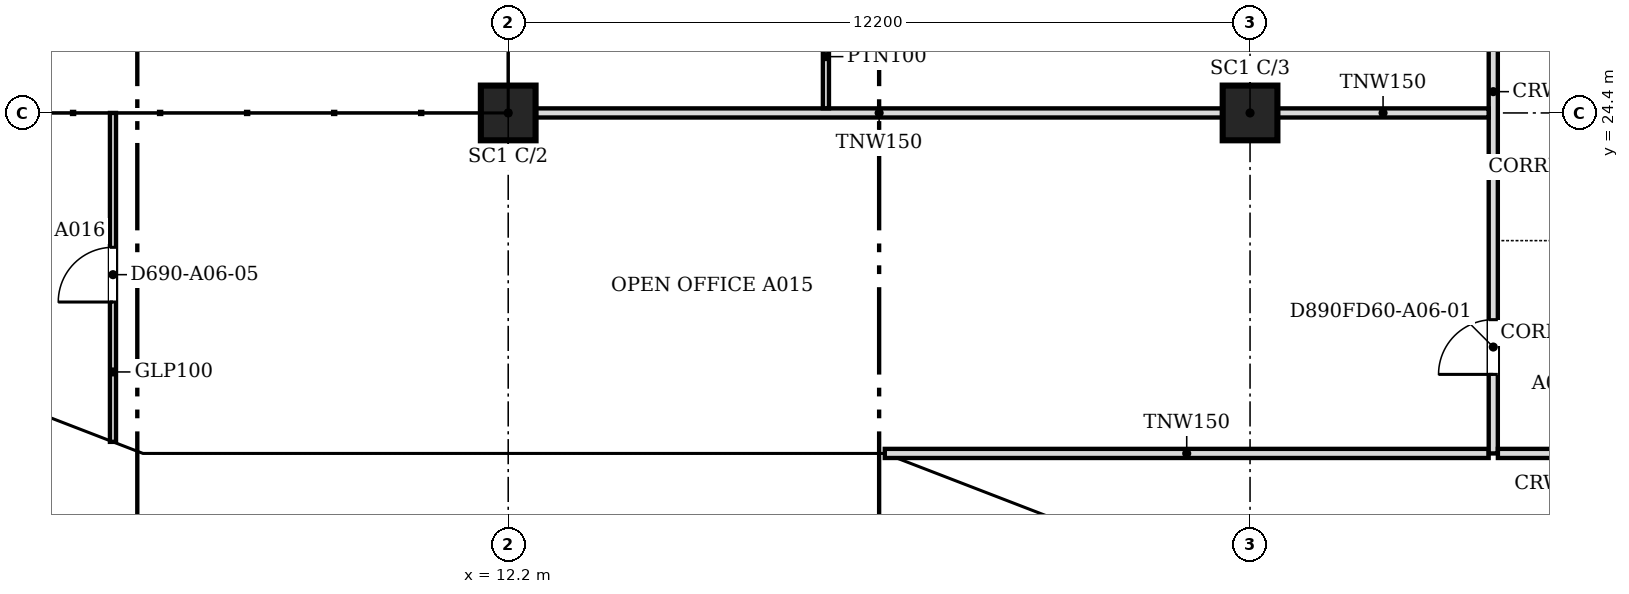
"""IFC4 building model, lengths in metres.
Left out: names, types, materials, properties, quantities, classifications, styles, units other than length and angle.
Written with IfcOpenShell. Run it as: python <this file> out.ifc"""

import sys

from ifc_helpers import new_model, si_unit, direction, frame, frame_2d, origin, origin_2d, place, context, subcontext, project, spatial, polyline, rectangle, outline, extrude, faceted_brep, source, transform, mapped, element, fill, save


model = new_model("IFC4")
c1 = context("Model", 3, precision=1e-05, world=origin(), true_north=direction((0.0, 1.0)))
c2 = subcontext(c1, "Body", "Model", "MODEL_VIEW")
j1 = project(units=[si_unit("LENGTHUNIT", "METRE"), si_unit("PLANEANGLEUNIT", "RADIAN")], contexts=[c1])
p1 = place(None, origin())
s1 = spatial("IfcSite", under=j1, at=p1, CompositionType="ELEMENT")
p2 = place(p1, origin())
s2 = spatial("IfcBuilding", under=s1, at=p2, CompositionType="ELEMENT")
p3 = place(p2, frame((0.0, 0.0, 72.4)))
s3 = spatial("IfcBuildingStorey", under=s2, at=p3, CompositionType="ELEMENT", Elevation=72.4)
for number, where, z_axis, x_axis in (
    (1, (12.2, 24.4, 0.0), (0.0, 0.0, 1.0), (1.0, 0.0, 0.0)),
    (2, (24.4, 24.4, 0.0), (0.0, 0.0, 1.0), (1.0, 0.0, 0.0)),
):
    element("IfcColumn", number, at=place(p3, frame(where, z_axis=z_axis, x_axis=x_axis)), inside=s3, PredefinedType="COLUMN", context=c2, shape_type="SweptSolid", body=[
        extrude(rectangle(XDim=0.9, YDim=0.9, at=origin_2d()), origin(), (0.0, 0.0, 1.0), 3.6),
    ])
m1 = source(origin(), c2, "Body", "Brep", [
    faceted_brep([(0.053, -0.25, 0.0), (3.003, -0.25, 3.8), (0.053, -0.25, 7.6), (0.0, -0.25, 7.531), (0.0, -0.25, 0.068), (0.106, 0.25, 7.532), (2.957, 0.25, 3.86), (2.957, 0.25, 3.74), (0.106, 0.25, 0.068), (3.003, 0.0, 3.8), (0.053, 0.0, 0.0), (0.053, 0.0, 7.6)], [[[0, 1, 2, 3, 4]], [[5, 6, 7, 8]], [[8, 7, 9, 1, 0, 10]], [[6, 5, 11, 2, 1, 9]], [[3, 2, 11]], [[10, 0, 4]], [[8, 10, 4, 3, 11, 5]], [[9, 7, 6]]]),
])
p4 = place(p3, frame((3.344, 19.631, -3.8), z_axis=(0.0, 0.0, 1.0), x_axis=(0.933007896601, -0.359855894603, 0.0)))
e3 = element("IfcWall", 3, at=p4, inside=s3, PredefinedType="SOLIDWALL", context=c2, shape_type="MappedRepresentation", body=[
    mapped(m1, transform((0.0, 0.0, 0.0), scale=1.0)),
])
m2 = source(origin(), c2, "Body", "SweptSolid", [
    extrude(outline(polyline([(0.253, 0.665), (2.687, 3.8), (0.253, 6.935), (0.253, 0.665)])), frame((0.0, 0.26, 0.0), z_axis=(0.0, -1.0, 0.0), x_axis=(1.0, 0.0, 0.0)), (0.0, 0.0, 1.0), 0.52),
])
p5 = place(p4, origin())
e4 = element("IfcOpeningElement", 4, at=p5, cuts=e3, PredefinedType="OPENING", context=c2, shape_type="MappedRepresentation", body=[
    mapped(m2, transform((0.0, 0.0, 0.0), scale=1.0)),
])
m3 = source(origin(), c2, "Body", "Brep", [
    faceted_brep([(3.003, -0.25, 0.0), (6.053, -0.25, 3.8), (3.003, -0.25, 7.6), (0.0, -0.25, 3.8), (0.047, 0.25, 3.859), (3.003, 0.25, 7.6), (6.053, 0.25, 3.8), (3.003, 0.25, 0.0), (0.047, 0.25, 3.741), (0.0, 0.0, 3.8)], [[[0, 1, 2, 3]], [[4, 5, 6, 7, 8]], [[7, 6, 1, 0]], [[6, 5, 2, 1]], [[5, 4, 9, 3, 2]], [[8, 7, 0, 3, 9]], [[8, 9, 4]]]),
])
p6 = place(p3, frame((6.146, 18.55, -3.8), z_axis=(0.0, 0.0, 1.0), x_axis=(1.0, 0.0, 0.0)))
e5 = element("IfcWall", 5, at=p6, inside=s3, PredefinedType="SOLIDWALL", context=c2, shape_type="MappedRepresentation", body=[
    mapped(m3, transform((0.0, 0.0, 0.0), scale=1.0)),
])
m4 = source(origin(), c2, "Body", "SweptSolid", [
    extrude(outline(polyline([(3.005, 0.401), (5.733, 3.8), (3.005, 7.199), (0.319, 3.8), (3.005, 0.401)])), frame((0.0, 0.26, 0.0), z_axis=(0.0, -1.0, 0.0), x_axis=(1.0, 0.0, 0.0)), (0.0, 0.0, 1.0), 0.52),
])
p7 = place(p6, origin())
e6 = element("IfcOpeningElement", 6, at=p7, cuts=e5, PredefinedType="OPENING", context=c2, shape_type="MappedRepresentation", body=[
    mapped(m4, transform((0.0, 0.0, 0.0), scale=1.0)),
])
m5 = source(origin(), c2, "Body", "Brep", [
    faceted_brep([(3.05, -0.25, 0.0), (6.1, -0.25, 3.743), (6.1, -0.25, 3.857), (3.05, -0.25, 7.6), (0.0, -0.25, 3.8), (0.0, 0.25, 3.8), (3.05, 0.25, 7.6), (6.146, 0.25, 3.8), (3.05, 0.25, 0.0), (6.146, -0.0, 3.8)], [[[0, 1, 2, 3, 4]], [[5, 6, 7, 8]], [[8, 7, 9, 1, 0]], [[7, 6, 3, 2, 9]], [[6, 5, 4, 3]], [[5, 8, 0, 4]], [[1, 9, 2]]]),
])
p8 = place(p3, frame((12.2, 18.55, -3.8), z_axis=(0.0, 0.0, 1.0), x_axis=(1.0, 0.0, 0.0)))
e7 = element("IfcWall", 7, at=p8, inside=s3, PredefinedType="SOLIDWALL", context=c2, shape_type="MappedRepresentation", body=[
    mapped(m5, transform((0.0, 0.0, 0.0), scale=1.0)),
])
m6 = source(origin(), c2, "Body", "SweptSolid", [
    extrude(outline(polyline([(3.052, 0.397), (5.824, 3.8), (3.052, 7.202), (0.321, 3.8), (3.052, 0.397)])), frame((0.0, 0.26, 0.0), z_axis=(0.0, -1.0, 0.0), x_axis=(1.0, 0.0, 0.0)), (0.0, 0.0, 1.0), 0.52),
])
p9 = place(p8, origin())
e8 = element("IfcOpeningElement", 8, at=p9, cuts=e7, PredefinedType="OPENING", context=c2, shape_type="MappedRepresentation", body=[
    mapped(m6, transform((0.0, 0.0, 0.0), scale=1.0)),
])
m7 = source(origin(), c2, "Body", "Brep", [
    faceted_brep([(3.096, -0.25, 7.536), (0.047, -0.25, 3.856), (0.047, -0.25, 3.744), (3.096, -0.25, 0.064), (0.0, 0.25, 3.8), (3.149, 0.25, 7.6), (3.202, 0.25, 7.536), (3.202, 0.25, 0.064), (3.149, 0.25, 0.0), (3.149, -0.0, 0.0), (3.149, -0.0, 7.6), (0.0, 0.0, 3.8)], [[[0, 1, 2, 3]], [[4, 5, 6, 7, 8]], [[8, 7, 9]], [[6, 5, 10]], [[5, 4, 11, 1, 0, 10]], [[4, 8, 9, 3, 2, 11]], [[11, 2, 1]], [[3, 9, 7, 6, 10, 0]]]),
])
p10 = place(p3, frame((18.346, 18.55, -3.8), z_axis=(0.0, 0.0, 1.0), x_axis=(0.932985567668, -0.359913782069, 0.0)))
e9 = element("IfcWall", 9, at=p10, inside=s3, PredefinedType="SOLIDWALL", context=c2, shape_type="MappedRepresentation", body=[
    mapped(m7, transform((0.0, 0.0, 0.0), scale=1.0)),
])
m8 = source(origin(), c2, "Body", "SweptSolid", [
    extrude(outline(polyline([(2.949, 6.967), (0.325, 3.8), (2.949, 0.633), (2.949, 6.967)])), frame((0.0, 0.26, 0.0), z_axis=(0.0, -1.0, 0.0), x_axis=(1.0, 0.0, 0.0)), (0.0, 0.0, 1.0), 0.52),
])
p11 = place(p10, origin())
e10 = element("IfcOpeningElement", 10, at=p11, cuts=e9, PredefinedType="OPENING", context=c2, shape_type="MappedRepresentation", body=[
    mapped(m8, transform((0.0, 0.0, 0.0), scale=1.0)),
])
p12 = place(p2, frame((0.0, 0.0, 76.2)))
s4 = spatial("IfcBuildingStorey", under=s2, at=p12, CompositionType="ELEMENT", Elevation=76.2)
m9 = source(origin(), c2, "Body", "Brep", [
    faceted_brep([(2.95, -0.25, 0.0), (2.997, -0.25, 0.059), (2.997, -0.25, 7.541), (2.95, -0.25, 7.6), (0.0, -0.25, 3.8), (0.053, 0.25, 3.868), (2.904, 0.25, 7.54), (2.904, 0.25, 0.06), (0.053, 0.25, 3.732), (2.95, 0.0, 0.0), (2.95, 0.0, 7.6), (0.0, 0.0, 3.8)], [[[0, 1, 2, 3, 4]], [[5, 6, 7, 8]], [[1, 0, 9]], [[10, 3, 2]], [[6, 5, 11, 4, 3, 10]], [[8, 7, 9, 0, 4, 11]], [[8, 11, 5]], [[1, 9, 7, 6, 10, 2]]]),
])
p13 = place(p12, frame((3.394, 19.612, -3.8), z_axis=(0.0, 0.0, 1.0), x_axis=(0.932990326376, -0.359901446078, 0.0)))
e11 = element("IfcWall", 11, at=p13, inside=s4, PredefinedType="SOLIDWALL", context=c2, shape_type="MappedRepresentation", body=[
    mapped(m9, transform((0.0, 0.0, 0.0), scale=1.0)),
])
m10 = source(origin(), c2, "Body", "SweptSolid", [
    extrude(outline(polyline([(2.75, 6.935), (0.316, 3.8), (2.75, 0.665), (2.75, 6.935)])), frame((0.0, 0.26, 0.0), z_axis=(0.0, -1.0, 0.0), x_axis=(1.0, 0.0, 0.0)), (0.0, 0.0, 1.0), 0.52),
])
p14 = place(p13, origin())
e12 = element("IfcOpeningElement", 12, at=p14, cuts=e11, PredefinedType="OPENING", context=c2, shape_type="MappedRepresentation", body=[
    mapped(m10, transform((0.0, 0.0, 0.0), scale=1.0)),
])
m11 = source(origin(), c2, "Body", "Brep", [
    faceted_brep([(0.047, -0.25, 0.0), (3.05, -0.25, 3.8), (0.047, -0.25, 7.6), (0.0, -0.25, 7.54), (0.0, -0.25, 0.06), (0.093, 0.25, 7.541), (3.05, 0.25, 3.8), (0.093, 0.25, 0.059), (0.047, 0.0, 0.0), (0.047, 0.0, 7.6)], [[[0, 1, 2, 3, 4]], [[5, 6, 7]], [[7, 6, 1, 0, 8]], [[6, 5, 9, 2, 1]], [[3, 2, 9]], [[8, 0, 4]], [[7, 8, 4, 3, 9, 5]]]),
])
p15 = place(p12, frame((6.1, 18.55, -3.8), z_axis=(0.0, 0.0, 1.0), x_axis=(1.0, 0.0, 0.0)))
e13 = element("IfcWall", 13, at=p15, inside=s4, PredefinedType="SOLIDWALL", context=c2, shape_type="MappedRepresentation", body=[
    mapped(m11, transform((0.0, 0.0, 0.0), scale=1.0)),
])
m12 = source(origin(), c2, "Body", "SweptSolid", [
    extrude(outline(polyline([(0.247, 0.656), (2.731, 3.8), (0.247, 6.944), (0.247, 0.656)])), frame((0.0, 0.26, 0.0), z_axis=(0.0, -1.0, 0.0), x_axis=(1.0, 0.0, 0.0)), (0.0, 0.0, 1.0), 0.52),
])
p16 = place(p15, origin())
e14 = element("IfcOpeningElement", 14, at=p16, cuts=e13, PredefinedType="OPENING", context=c2, shape_type="MappedRepresentation", body=[
    mapped(m12, transform((0.0, 0.0, 0.0), scale=1.0)),
])
m13 = source(origin(), c2, "Body", "SweptSolid", [
    extrude(outline(polyline([(3.05, 0.0), (6.1, 3.8), (3.05, 7.6), (0.0, 3.8), (3.05, 0.0)])), frame((0.0, 0.25, 0.0), z_axis=(0.0, -1.0, 0.0), x_axis=(1.0, 0.0, 0.0)), (0.0, 0.0, 1.0), 0.5),
])
p17 = place(p12, frame((9.15, 18.55, -3.8), z_axis=(0.0, 0.0, 1.0), x_axis=(1.0, 0.0, 0.0)))
e15 = element("IfcWall", 15, at=p17, inside=s4, PredefinedType="SOLIDWALL", context=c2, shape_type="MappedRepresentation", body=[
    mapped(m13, transform((0.0, 0.0, 0.0), scale=1.0)),
])
m14 = source(origin(), c2, "Body", "SweptSolid", [
    extrude(outline(polyline([(3.05, 0.399), (5.78, 3.8), (3.05, 7.201), (0.321, 3.8), (3.05, 0.399)])), frame((0.0, 0.26, 0.0), z_axis=(0.0, -1.0, 0.0), x_axis=(1.0, 0.0, 0.0)), (0.0, 0.0, 1.0), 0.52),
])
p18 = place(p17, origin())
e16 = element("IfcOpeningElement", 16, at=p18, cuts=e15, PredefinedType="OPENING", context=c2, shape_type="MappedRepresentation", body=[
    mapped(m14, transform((0.0, 0.0, 0.0), scale=1.0)),
])
m15 = source(origin(), c2, "Body", "Brep", [
    faceted_brep([(3.05, -0.25, 7.543), (0.0, -0.25, 3.8), (3.05, -0.25, 0.057), (0.0, 0.25, 3.8), (3.096, 0.25, 7.6), (3.143, 0.25, 7.544), (3.143, 0.25, 0.056), (3.096, 0.25, 0.0), (3.096, -0.0, 0.0), (3.096, -0.0, 7.6)], [[[0, 1, 2]], [[3, 4, 5, 6, 7]], [[7, 6, 8]], [[5, 4, 9]], [[4, 3, 1, 0, 9]], [[3, 7, 8, 2, 1]], [[2, 8, 6, 5, 9, 0]]]),
])
p19 = place(p12, frame((15.25, 18.55, -3.8), z_axis=(0.0, 0.0, 1.0), x_axis=(1.0, 0.0, 0.0)))
e17 = element("IfcWall", 17, at=p19, inside=s4, PredefinedType="SOLIDWALL", context=c2, shape_type="MappedRepresentation", body=[
    mapped(m15, transform((0.0, 0.0, 0.0), scale=1.0)),
])
m16 = source(origin(), c2, "Body", "SweptSolid", [
    extrude(outline(polyline([(2.896, 6.959), (0.323, 3.8), (2.896, 0.641), (2.896, 6.959)])), frame((0.0, 0.26, 0.0), z_axis=(0.0, -1.0, 0.0), x_axis=(1.0, 0.0, 0.0)), (0.0, 0.0, 1.0), 0.52),
])
p20 = place(p19, origin())
e18 = element("IfcOpeningElement", 18, at=p20, cuts=e17, PredefinedType="OPENING", context=c2, shape_type="MappedRepresentation", body=[
    mapped(m16, transform((0.0, 0.0, 0.0), scale=1.0)),
])
m17 = source(origin(), c2, "Body", "Brep", [
    faceted_brep([(0.093, -0.25, 0.056), (3.143, -0.25, 3.736), (3.143, -0.25, 3.864), (0.093, -0.25, 7.544), (0.0, 0.25, 7.543), (0.047, 0.25, 7.6), (3.196, 0.25, 3.8), (0.047, 0.25, 0.0), (0.0, 0.25, 0.057), (3.196, -0.0, 3.8), (0.047, 0.0, 0.0), (0.047, 0.0, 7.6)], [[[0, 1, 2, 3]], [[4, 5, 6, 7, 8]], [[7, 6, 9, 1, 0, 10]], [[6, 5, 11, 3, 2, 9]], [[5, 4, 11]], [[8, 7, 10]], [[8, 10, 0, 3, 11, 4]], [[1, 9, 2]]]),
])
p21 = place(p12, frame((18.303, 18.567, -3.8), z_axis=(0.0, 0.0, 1.0), x_axis=(0.932978940178, -0.359930961693, 0.0)))
e19 = element("IfcWall", 19, at=p21, inside=s4, PredefinedType="SOLIDWALL", context=c2, shape_type="MappedRepresentation", body=[
    mapped(m17, transform((0.0, 0.0, 0.0), scale=1.0)),
])
m18 = source(origin(), c2, "Body", "SweptSolid", [
    extrude(outline(polyline([(0.247, 0.633), (2.871, 3.8), (0.247, 6.967), (0.247, 0.633)])), frame((0.0, 0.26, 0.0), z_axis=(0.0, -1.0, 0.0), x_axis=(1.0, 0.0, 0.0)), (0.0, 0.0, 1.0), 0.52),
])
p22 = place(p21, origin())
e20 = element("IfcOpeningElement", 20, at=p22, cuts=e19, PredefinedType="OPENING", context=c2, shape_type="MappedRepresentation", body=[
    mapped(m18, transform((0.0, 0.0, 0.0), scale=1.0)),
])
p23 = place(p3, frame((18.393, 18.8, 0.0), z_axis=(0.0, 0.0, 1.0), x_axis=(1.0, 0.0, 0.0)))
e21 = element("IfcWall", 21, at=p23, inside=s3, PredefinedType="PARTITIONING", context=c2, shape_type="SweptSolid", body=[
    extrude(rectangle(XDim=9.931, YDim=0.15, at=frame_2d((4.965, 0.0))), origin(), (0.0, 0.0, 1.0), 3.067),
])
p24 = place(p3, frame((28.4, 18.8, 0.0), z_axis=(0.0, 0.0, 1.0), x_axis=(0.0, 1.0, 0.0)))
e22 = element("IfcWall", 22, at=p24, inside=s3, PredefinedType="PARTITIONING", context=c2, shape_type="SweptSolid", body=[
    extrude(rectangle(XDim=26.824, YDim=0.15, at=frame_2d((13.412, 0.0))), origin(), (0.0, 0.0, 1.0), 3.067),
])
m19 = source(origin(), c2, "Body", "SweptSolid", [
    extrude(rectangle(XDim=0.9, YDim=2.1, at=frame_2d((0.45, 1.05))), frame((0.0, 0.085, 0.0), z_axis=(0.0, -1.0, 0.0), x_axis=(1.0, 0.0, 0.0)), (0.0, 0.0, 1.0), 0.17),
])
p25 = place(p24, frame((1.3, 0.0, 0.0)))
e23 = element("IfcOpeningElement", 23, at=p25, cuts=e22, PredefinedType="OPENING", context=c2, shape_type="MappedRepresentation", body=[
    mapped(m19, transform((0.0, 0.0, 0.0), scale=1.0)),
])
p26 = place(p24, frame((23.351, 0.0, 0.0)))
e24 = element("IfcOpeningElement", 24, at=p26, cuts=e22, PredefinedType="OPENING", context=c2, shape_type="MappedRepresentation", body=[
    mapped(m19, transform((0.0, 0.0, 0.0), scale=1.0)),
])
p27 = place(p24, frame((17.351, 0.0, 0.0)))
e25 = element("IfcOpeningElement", 25, at=p27, cuts=e22, PredefinedType="OPENING", context=c2, shape_type="MappedRepresentation", body=[
    mapped(m19, transform((0.0, 0.0, 0.0), scale=1.0)),
])
p28 = place(p24, frame((9.7, 0.0, 0.0)))
e26 = element("IfcOpeningElement", 26, at=p28, cuts=e22, PredefinedType="OPENING", context=c2, shape_type="MappedRepresentation", body=[
    mapped(m19, transform((0.0, 0.0, 0.0), scale=1.0)),
])
p29 = place(p3, frame((28.476, 18.8, 0.0), z_axis=(0.0, 0.0, 1.0), x_axis=(1.0, 0.0, 0.0)))
e27 = element("IfcWall", 27, at=p29, inside=s3, PredefinedType="PARTITIONING", context=c2, shape_type="SweptSolid", body=[
    extrude(rectangle(XDim=1.948, YDim=0.15, at=frame_2d((0.974, 0.0))), origin(), (0.0, 0.0, 1.0), 3.067),
])
p30 = place(p3, frame((5.7, 18.99, 0.0), z_axis=(0.0, 0.0, 1.0), x_axis=(0.0, 1.0, 0.0)))
e28 = element("IfcWall", 28, at=p30, inside=s3, PredefinedType="PARTITIONING", context=c2, shape_type="SweptSolid", body=[
    extrude(rectangle(XDim=5.41, YDim=0.1, at=frame_2d((2.705, 0.0))), origin(), (0.0, 0.0, 1.0), 3.067),
])
m20 = source(origin(), c2, "Body", "SweptSolid", [
    extrude(rectangle(XDim=0.9, YDim=2.1, at=frame_2d((0.45, 1.05))), frame((0.0, 0.06, 0.0), z_axis=(0.0, -1.0, 0.0), x_axis=(1.0, 0.0, 0.0)), (0.0, 0.0, 1.0), 0.12),
])
p31 = place(p30, frame((2.3, 0.0, 0.0)))
e29 = element("IfcOpeningElement", 29, at=p31, cuts=e28, PredefinedType="OPENING", context=c2, shape_type="MappedRepresentation", body=[
    mapped(m20, transform((0.0, 0.0, 0.0), scale=1.0)),
])
p32 = place(p3, frame((12.651, 24.4, 0.0), z_axis=(0.0, 0.0, 1.0), x_axis=(1.0, 0.0, 0.0)))
e30 = element("IfcWall", 30, at=p32, inside=s3, PredefinedType="PARTITIONING", context=c2, shape_type="SweptSolid", body=[
    extrude(rectangle(XDim=11.298, YDim=0.15, at=frame_2d((5.649, 0.0))), origin(), (0.0, 0.0, 1.0), 3.067),
])
p33 = place(p3, frame((24.851, 24.4, 0.0), z_axis=(0.0, 0.0, 1.0), x_axis=(1.0, 0.0, 0.0)))
e31 = element("IfcWall", 31, at=p33, inside=s3, PredefinedType="PARTITIONING", context=c2, shape_type="SweptSolid", body=[
    extrude(rectangle(XDim=3.473, YDim=0.15, at=frame_2d((1.736, 0.0))), origin(), (0.0, 0.0, 1.0), 3.067),
])
p34 = place(p3, frame((17.425, 24.476, 0.0), z_axis=(0.0, 0.0, 1.0), x_axis=(0.0, 1.0, 0.0)))
e32 = element("IfcWall", 32, at=p34, inside=s3, PredefinedType="PARTITIONING", context=c2, shape_type="SweptSolid", body=[
    extrude(rectangle(XDim=4.293, YDim=0.1, at=frame_2d((2.146, 0.0))), origin(), (0.0, 0.0, 1.0), 3.067),
])
p35 = place(p34, frame((1.7, 0.0, 0.0)))
e33 = element("IfcOpeningElement", 33, at=p35, cuts=e32, PredefinedType="OPENING", context=c2, shape_type="MappedRepresentation", body=[
    mapped(m20, transform((0.0, 0.0, 0.0), scale=1.0)),
])
m21 = source(origin(), c2, "Body", "SweptSolid", [
    extrude(rectangle(XDim=0.9, YDim=2.1, at=frame_2d((0.45, 1.05))), frame((0.0, 0.025, 0.0), z_axis=(0.0, -1.0, 0.0), x_axis=(1.0, 0.0, 0.0)), (0.0, 0.0, 1.0), 0.05),
])
p36 = place(p25, origin())
e34 = element("IfcDoor", 34, at=p36, inside=s3, OperationType="SINGLE_SWING_LEFT", PredefinedType="DOOR", context=c2, shape_type="MappedRepresentation", body=[
    mapped(m21, transform((0.0, 0.0, 0.0), scale=1.0)),
])
fill(e23, e34)
p37 = place(p31, origin())
e35 = element("IfcDoor", 35, at=p37, inside=s3, OperationType="SINGLE_SWING_LEFT", PredefinedType="DOOR", context=c2, shape_type="MappedRepresentation", body=[
    mapped(m21, transform((0.0, 0.0, 0.0), scale=1.0)),
])
fill(e29, e35)
save(model, sys.argv[1])
